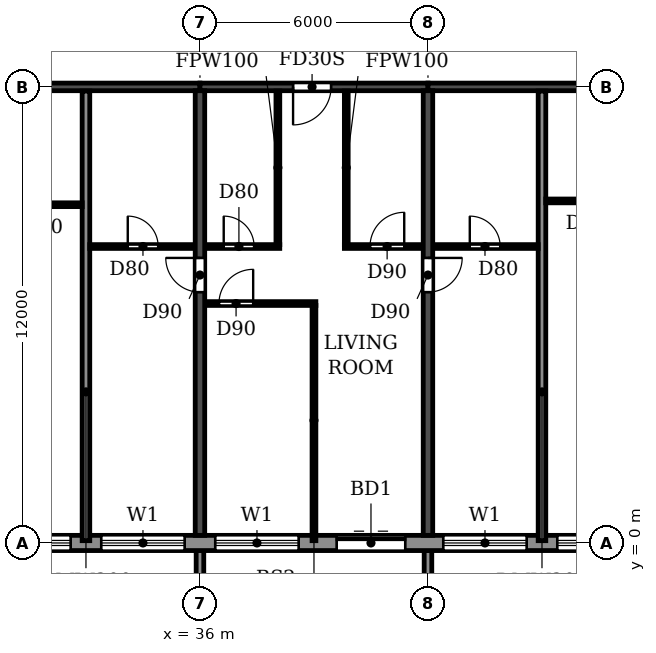
"""IFC4 building model, lengths in metres.
Left out: names, types, materials, properties, quantities, classifications, styles, units other than length and angle.
Written with IfcOpenShell. Run it as: python <this file> out.ifc"""

import sys

from ifc_helpers import new_model, si_unit, direction, frame, frame_2d, origin, place, context, subcontext, project, spatial, polyline, rectangle, outline, extrude, source, transform, mapped, element, fill, save


model = new_model("IFC4")
c1 = context("Model", 3, precision=1e-05, world=origin(), true_north=direction((0.0, 1.0)))
c2 = subcontext(c1, "Body", "Model", "MODEL_VIEW")
j1 = project(units=[si_unit("LENGTHUNIT", "METRE"), si_unit("PLANEANGLEUNIT", "RADIAN")], contexts=[c1])
p1 = place(None, origin())
s1 = spatial("IfcSite", under=j1, at=p1, CompositionType="ELEMENT")
p2 = place(p1, origin())
s2 = spatial("IfcBuilding", under=s1, at=p2, CompositionType="ELEMENT")
p3 = place(p2, frame((0.0, 0.0, 231.3)))
s3 = spatial("IfcBuildingStorey", under=s2, at=p3, CompositionType="ELEMENT", Elevation=231.3)
p4 = place(p3, frame((36.0, 0.2, 0.0), z_axis=(0.0, 0.0, 1.0), x_axis=(0.0, 1.0, 0.0)))
e1 = element("IfcWall", 1, at=p4, inside=s3, PredefinedType="SHEAR", context=c2, shape_type="SweptSolid", body=[
    extrude(rectangle(XDim=11.7, YDim=0.25, at=frame_2d((5.85, 0.0))), origin(), (0.0, 0.0, 1.0), 3.08),
])
p5 = place(p4, frame((6.4, 0.0, 0.0)))
e2 = element("IfcOpeningElement", 2, at=p5, cuts=e1, PredefinedType="OPENING", context=c2, shape_type="SweptSolid", body=[
    extrude(rectangle(XDim=0.9, YDim=2.1, at=frame_2d((0.45, 1.05))), frame((0.0, 0.135, 0.0), z_axis=(0.0, -1.0, 0.0), x_axis=(1.0, 0.0, 0.0)), (0.0, 0.0, 1.0), 0.27),
])
p6 = place(p3, frame((42.0, 0.2, 0.0), z_axis=(0.0, 0.0, 1.0), x_axis=(0.0, 1.0, 0.0)))
e3 = element("IfcWall", 3, at=p6, inside=s3, PredefinedType="SHEAR", context=c2, shape_type="SweptSolid", body=[
    extrude(rectangle(XDim=11.7, YDim=0.25, at=frame_2d((5.85, 0.0))), origin(), (0.0, 0.0, 1.0), 3.08),
])
p7 = place(p6, frame((6.4, 0.0, 0.0)))
e4 = element("IfcOpeningElement", 4, at=p7, cuts=e3, PredefinedType="OPENING", context=c2, shape_type="SweptSolid", body=[
    extrude(rectangle(XDim=0.9, YDim=2.1, at=frame_2d((0.45, 1.05))), frame((0.0, 0.135, 0.0), z_axis=(0.0, -1.0, 0.0), x_axis=(1.0, 0.0, 0.0)), (0.0, 0.0, 1.0), 0.27),
])
p8 = place(p3, frame((30.0, 12.0, 0.0), z_axis=(0.0, 0.0, 1.0), x_axis=(1.0, 0.0, 0.0)))
e5 = element("IfcWall", 5, at=p8, inside=s3, PredefinedType="SHEAR", context=c2, shape_type="SweptSolid", body=[
    extrude(rectangle(XDim=6.0, YDim=0.2, at=frame_2d((3.0, 0.0))), origin(), (0.0, 0.0, 1.0), 2.48),
])
p9 = place(p3, frame((36.0, 12.0, 0.0), z_axis=(0.0, 0.0, 1.0), x_axis=(1.0, 0.0, 0.0)))
e6 = element("IfcWall", 6, at=p9, inside=s3, PredefinedType="SHEAR", context=c2, shape_type="SweptSolid", body=[
    extrude(rectangle(XDim=6.0, YDim=0.2, at=frame_2d((3.0, 0.0))), origin(), (0.0, 0.0, 1.0), 2.48),
])
p10 = place(p9, frame((2.45, 0.0, 0.0)))
e7 = element("IfcOpeningElement", 7, at=p10, cuts=e6, PredefinedType="OPENING", context=c2, shape_type="SweptSolid", body=[
    extrude(rectangle(XDim=1.0, YDim=2.1, at=frame_2d((0.5, 1.05))), frame((0.0, 0.11, 0.0), z_axis=(0.0, -1.0, 0.0), x_axis=(1.0, 0.0, 0.0)), (0.0, 0.0, 1.0), 0.22),
])
p11 = place(p3, frame((42.0, 12.0, 0.0), z_axis=(0.0, 0.0, 1.0), x_axis=(1.0, 0.0, 0.0)))
e8 = element("IfcWall", 8, at=p11, inside=s3, PredefinedType="SHEAR", context=c2, shape_type="SweptSolid", body=[
    extrude(rectangle(XDim=6.0, YDim=0.2, at=frame_2d((3.0, 0.0))), origin(), (0.0, 0.0, 1.0), 2.48),
])
p12 = place(p3, frame((22.683, 0.0, 0.0), z_axis=(0.0, 0.0, 1.0), x_axis=(1.0, 0.0, 0.0)))
e9 = element("IfcWall", 9, at=p12, inside=s3, PredefinedType="STANDARD", context=c2, shape_type="SweptSolid", body=[
    extrude(rectangle(XDim=56.634, YDim=0.4, at=frame_2d((28.317, 0.0))), origin(), (0.0, 0.0, 1.0), 3.08),
])
p13 = place(p12, frame((1.917, 0.0, 0.0)))
e10 = element("IfcOpeningElement", 10, at=p13, cuts=e9, PredefinedType="OPENING", context=c2, shape_type="SweptSolid", body=[
    extrude(rectangle(XDim=1.8, YDim=2.4, at=frame_2d((0.9, 1.2))), frame((0.0, 0.21, 0.0), z_axis=(0.0, -1.0, 0.0), x_axis=(1.0, 0.0, 0.0)), (0.0, 0.0, 1.0), 0.42),
])
p14 = place(p12, frame((4.717, 0.0, 0.9)))
e11 = element("IfcOpeningElement", 11, at=p14, cuts=e9, PredefinedType="OPENING", context=c2, shape_type="SweptSolid", body=[
    extrude(rectangle(XDim=2.2, YDim=1.5, at=frame_2d((1.1, 0.75))), frame((0.0, 0.21, 0.0), z_axis=(0.0, -1.0, 0.0), x_axis=(1.0, 0.0, 0.0)), (0.0, 0.0, 1.0), 0.42),
])
p15 = place(p12, frame((7.717, 0.0, 0.9)))
e12 = element("IfcOpeningElement", 12, at=p15, cuts=e9, PredefinedType="OPENING", context=c2, shape_type="SweptSolid", body=[
    extrude(rectangle(XDim=2.2, YDim=1.5, at=frame_2d((1.1, 0.75))), frame((0.0, 0.21, 0.0), z_axis=(0.0, -1.0, 0.0), x_axis=(1.0, 0.0, 0.0)), (0.0, 0.0, 1.0), 0.42),
])
p16 = place(p12, frame((10.717, 0.0, 0.9)))
e13 = element("IfcOpeningElement", 13, at=p16, cuts=e9, PredefinedType="OPENING", context=c2, shape_type="SweptSolid", body=[
    extrude(rectangle(XDim=2.2, YDim=1.5, at=frame_2d((1.1, 0.75))), frame((0.0, 0.21, 0.0), z_axis=(0.0, -1.0, 0.0), x_axis=(1.0, 0.0, 0.0)), (0.0, 0.0, 1.0), 0.42),
])
p17 = place(p12, frame((13.717, 0.0, 0.9)))
e14 = element("IfcOpeningElement", 14, at=p17, cuts=e9, PredefinedType="OPENING", context=c2, shape_type="SweptSolid", body=[
    extrude(rectangle(XDim=2.2, YDim=1.5, at=frame_2d((1.1, 0.75))), frame((0.0, 0.21, 0.0), z_axis=(0.0, -1.0, 0.0), x_axis=(1.0, 0.0, 0.0)), (0.0, 0.0, 1.0), 0.42),
])
p18 = place(p12, frame((16.917, 0.0, 0.0)))
e15 = element("IfcOpeningElement", 15, at=p18, cuts=e9, PredefinedType="OPENING", context=c2, shape_type="SweptSolid", body=[
    extrude(rectangle(XDim=1.8, YDim=2.4, at=frame_2d((0.9, 1.2))), frame((0.0, 0.21, 0.0), z_axis=(0.0, -1.0, 0.0), x_axis=(1.0, 0.0, 0.0)), (0.0, 0.0, 1.0), 0.42),
])
p19 = place(p12, frame((19.717, 0.0, 0.9)))
e16 = element("IfcOpeningElement", 16, at=p19, cuts=e9, PredefinedType="OPENING", context=c2, shape_type="SweptSolid", body=[
    extrude(rectangle(XDim=2.2, YDim=1.5, at=frame_2d((1.1, 0.75))), frame((0.0, 0.21, 0.0), z_axis=(0.0, -1.0, 0.0), x_axis=(1.0, 0.0, 0.0)), (0.0, 0.0, 1.0), 0.42),
])
p20 = place(p12, frame((22.717, 0.0, 0.9)))
e17 = element("IfcOpeningElement", 17, at=p20, cuts=e9, PredefinedType="OPENING", context=c2, shape_type="SweptSolid", body=[
    extrude(rectangle(XDim=2.2, YDim=1.5, at=frame_2d((1.1, 0.75))), frame((0.0, 0.21, 0.0), z_axis=(0.0, -1.0, 0.0), x_axis=(1.0, 0.0, 0.0)), (0.0, 0.0, 1.0), 0.42),
])
p21 = place(p12, frame((25.917, 0.0, 0.0)))
e18 = element("IfcOpeningElement", 18, at=p21, cuts=e9, PredefinedType="OPENING", context=c2, shape_type="SweptSolid", body=[
    extrude(rectangle(XDim=1.8, YDim=2.4, at=frame_2d((0.9, 1.2))), frame((0.0, 0.21, 0.0), z_axis=(0.0, -1.0, 0.0), x_axis=(1.0, 0.0, 0.0)), (0.0, 0.0, 1.0), 0.42),
])
p22 = place(p12, frame((28.717, 0.0, 0.9)))
e19 = element("IfcOpeningElement", 19, at=p22, cuts=e9, PredefinedType="OPENING", context=c2, shape_type="SweptSolid", body=[
    extrude(rectangle(XDim=2.2, YDim=1.5, at=frame_2d((1.1, 0.75))), frame((0.0, 0.21, 0.0), z_axis=(0.0, -1.0, 0.0), x_axis=(1.0, 0.0, 0.0)), (0.0, 0.0, 1.0), 0.42),
])
p23 = place(p12, frame((31.717, 0.0, 0.9)))
e20 = element("IfcOpeningElement", 20, at=p23, cuts=e9, PredefinedType="OPENING", context=c2, shape_type="SweptSolid", body=[
    extrude(rectangle(XDim=2.2, YDim=1.5, at=frame_2d((1.1, 0.75))), frame((0.0, 0.21, 0.0), z_axis=(0.0, -1.0, 0.0), x_axis=(1.0, 0.0, 0.0)), (0.0, 0.0, 1.0), 0.42),
])
p24 = place(p12, frame((34.717, 0.0, 0.9)))
e21 = element("IfcOpeningElement", 21, at=p24, cuts=e9, PredefinedType="OPENING", context=c2, shape_type="SweptSolid", body=[
    extrude(rectangle(XDim=2.2, YDim=1.5, at=frame_2d((1.1, 0.75))), frame((0.0, 0.21, 0.0), z_axis=(0.0, -1.0, 0.0), x_axis=(1.0, 0.0, 0.0)), (0.0, 0.0, 1.0), 0.42),
])
p25 = place(p12, frame((37.717, 0.0, 0.9)))
e22 = element("IfcOpeningElement", 22, at=p25, cuts=e9, PredefinedType="OPENING", context=c2, shape_type="SweptSolid", body=[
    extrude(rectangle(XDim=2.2, YDim=1.5, at=frame_2d((1.1, 0.75))), frame((0.0, 0.21, 0.0), z_axis=(0.0, -1.0, 0.0), x_axis=(1.0, 0.0, 0.0)), (0.0, 0.0, 1.0), 0.42),
])
p26 = place(p12, frame((40.917, 0.0, 0.0)))
e23 = element("IfcOpeningElement", 23, at=p26, cuts=e9, PredefinedType="OPENING", context=c2, shape_type="SweptSolid", body=[
    extrude(rectangle(XDim=1.8, YDim=2.4, at=frame_2d((0.9, 1.2))), frame((0.0, 0.21, 0.0), z_axis=(0.0, -1.0, 0.0), x_axis=(1.0, 0.0, 0.0)), (0.0, 0.0, 1.0), 0.42),
])
p27 = place(p12, frame((43.717, 0.0, 0.9)))
e24 = element("IfcOpeningElement", 24, at=p27, cuts=e9, PredefinedType="OPENING", context=c2, shape_type="SweptSolid", body=[
    extrude(rectangle(XDim=2.2, YDim=1.5, at=frame_2d((1.1, 0.75))), frame((0.0, 0.21, 0.0), z_axis=(0.0, -1.0, 0.0), x_axis=(1.0, 0.0, 0.0)), (0.0, 0.0, 1.0), 0.42),
])
p28 = place(p12, frame((46.717, 0.0, 0.9)))
e25 = element("IfcOpeningElement", 25, at=p28, cuts=e9, PredefinedType="OPENING", context=c2, shape_type="SweptSolid", body=[
    extrude(rectangle(XDim=2.2, YDim=1.5, at=frame_2d((1.1, 0.75))), frame((0.0, 0.21, 0.0), z_axis=(0.0, -1.0, 0.0), x_axis=(1.0, 0.0, 0.0)), (0.0, 0.0, 1.0), 0.42),
])
p29 = place(p12, frame((49.717, 0.0, 0.9)))
e26 = element("IfcOpeningElement", 26, at=p29, cuts=e9, PredefinedType="OPENING", context=c2, shape_type="SweptSolid", body=[
    extrude(rectangle(XDim=2.2, YDim=1.5, at=frame_2d((1.1, 0.75))), frame((0.0, 0.21, 0.0), z_axis=(0.0, -1.0, 0.0), x_axis=(1.0, 0.0, 0.0)), (0.0, 0.0, 1.0), 0.42),
])
p30 = place(p12, frame((52.717, 0.0, 0.9)))
e27 = element("IfcOpeningElement", 27, at=p30, cuts=e9, PredefinedType="OPENING", context=c2, shape_type="SweptSolid", body=[
    extrude(rectangle(XDim=2.2, YDim=1.5, at=frame_2d((1.1, 0.75))), frame((0.0, 0.21, 0.0), z_axis=(0.0, -1.0, 0.0), x_axis=(1.0, 0.0, 0.0)), (0.0, 0.0, 1.0), 0.42),
])
m1 = source(origin(), c2, "Body", "SweptSolid", [
    extrude(outline(polyline([(0.0, 0.0), (0.2, 0.0), (0.2, 1.65), (0.0, 1.65), (0.0, 0.0)])), origin(), (0.0, 0.0, 1.0), 3.1),
])
for number, where in (
    (28, (35.9, -1.85, 0.0)),
    (29, (41.9, -1.85, 0.0)),
):
    element("IfcWall", number, at=place(p3, frame(where)), inside=s3, PredefinedType="STANDARD", context=c2, shape_type="MappedRepresentation", body=[
        mapped(m1, transform((0.0, 0.0, 0.0))),
    ])
for number, where, z_axis, x_axis in (
    (30, (33.0, 0.06, 0.0), (0.0, 0.0, 1.0), (0.0, 1.0, 0.0)),
    (31, (45.0, 0.06, 0.0), (0.0, 0.0, 1.0), (0.0, 1.0, 0.0)),
):
    element("IfcWall", number, at=place(p3, frame(where, z_axis=z_axis, x_axis=x_axis)), inside=s3, PredefinedType="PARTITIONING", context=c2, shape_type="SweptSolid", body=[
        extrude(rectangle(XDim=11.83, YDim=0.2, at=frame_2d((5.915, 0.0))), origin(), (0.0, 0.0, 1.0), 3.08),
    ])
p31 = place(p3, frame((36.135, 6.3, 0.0), z_axis=(0.0, 0.0, 1.0), x_axis=(1.0, 0.0, 0.0)))
e32 = element("IfcWall", 32, at=p31, inside=s3, PredefinedType="PARTITIONING", context=c2, shape_type="SweptSolid", body=[
    extrude(rectangle(XDim=2.915, YDim=0.1, at=frame_2d((1.458, 0.0))), origin(), (0.0, 0.0, 1.0), 3.08),
])
p32 = place(p31, frame((0.365, 0.0, 0.0)))
e33 = element("IfcOpeningElement", 33, at=p32, cuts=e32, PredefinedType="OPENING", context=c2, shape_type="SweptSolid", body=[
    extrude(rectangle(XDim=0.9, YDim=2.1, at=frame_2d((0.45, 1.05))), frame((0.0, 0.06, 0.0), z_axis=(0.0, -1.0, 0.0), x_axis=(1.0, 0.0, 0.0)), (0.0, 0.0, 1.0), 0.12),
])
p33 = place(p3, frame((33.1, 7.8, 0.0), z_axis=(0.0, 0.0, 1.0), x_axis=(1.0, 0.0, 0.0)))
e34 = element("IfcWall", 34, at=p33, inside=s3, PredefinedType="PARTITIONING", context=c2, shape_type="SweptSolid", body=[
    extrude(rectangle(XDim=2.765, YDim=0.1, at=frame_2d((1.382, 0.0))), origin(), (0.0, 0.0, 1.0), 3.08),
])
p34 = place(p33, frame((1.0, 0.0, 0.0)))
e35 = element("IfcOpeningElement", 35, at=p34, cuts=e34, PredefinedType="OPENING", context=c2, shape_type="SweptSolid", body=[
    extrude(rectangle(XDim=0.8, YDim=2.1, at=frame_2d((0.4, 1.05))), frame((0.0, 0.06, 0.0), z_axis=(0.0, -1.0, 0.0), x_axis=(1.0, 0.0, 0.0)), (0.0, 0.0, 1.0), 0.12),
])
p35 = place(p3, frame((36.135, 7.8, 0.0), z_axis=(0.0, 0.0, 1.0), x_axis=(1.0, 0.0, 0.0)))
e36 = element("IfcWall", 36, at=p35, inside=s3, PredefinedType="PARTITIONING", context=c2, shape_type="SweptSolid", body=[
    extrude(rectangle(XDim=1.965, YDim=0.1, at=frame_2d((0.982, 0.0))), origin(), (0.0, 0.0, 1.0), 3.08),
])
p36 = place(p35, frame((0.49, 0.0, 0.0)))
e37 = element("IfcOpeningElement", 37, at=p36, cuts=e36, PredefinedType="OPENING", context=c2, shape_type="SweptSolid", body=[
    extrude(rectangle(XDim=0.8, YDim=2.1, at=frame_2d((0.4, 1.05))), frame((0.0, 0.06, 0.0), z_axis=(0.0, -1.0, 0.0), x_axis=(1.0, 0.0, 0.0)), (0.0, 0.0, 1.0), 0.12),
])
p37 = place(p3, frame((39.8, 7.8, 0.0), z_axis=(0.0, 0.0, 1.0), x_axis=(1.0, 0.0, 0.0)))
e38 = element("IfcWall", 38, at=p37, inside=s3, PredefinedType="PARTITIONING", context=c2, shape_type="SweptSolid", body=[
    extrude(rectangle(XDim=2.065, YDim=0.1, at=frame_2d((1.032, 0.0))), origin(), (0.0, 0.0, 1.0), 3.08),
])
p38 = place(p37, frame((0.675, 0.0, 0.0)))
e39 = element("IfcOpeningElement", 39, at=p38, cuts=e38, PredefinedType="OPENING", context=c2, shape_type="SweptSolid", body=[
    extrude(rectangle(XDim=0.9, YDim=2.1, at=frame_2d((0.45, 1.05))), frame((0.0, 0.06, 0.0), z_axis=(0.0, -1.0, 0.0), x_axis=(1.0, 0.0, 0.0)), (0.0, 0.0, 1.0), 0.12),
])
p39 = place(p3, frame((42.135, 7.8, 0.0), z_axis=(0.0, 0.0, 1.0), x_axis=(1.0, 0.0, 0.0)))
e40 = element("IfcWall", 40, at=p39, inside=s3, PredefinedType="PARTITIONING", context=c2, shape_type="SweptSolid", body=[
    extrude(rectangle(XDim=2.765, YDim=0.1, at=frame_2d((1.382, 0.0))), origin(), (0.0, 0.0, 1.0), 3.08),
])
p40 = place(p39, frame((0.965, 0.0, 0.0)))
e41 = element("IfcOpeningElement", 41, at=p40, cuts=e40, PredefinedType="OPENING", context=c2, shape_type="SweptSolid", body=[
    extrude(rectangle(XDim=0.8, YDim=2.1, at=frame_2d((0.4, 1.05))), frame((0.0, 0.06, 0.0), z_axis=(0.0, -1.0, 0.0), x_axis=(1.0, 0.0, 0.0)), (0.0, 0.0, 1.0), 0.12),
])
p41 = place(p3, frame((30.135, 8.9, 0.0), z_axis=(0.0, 0.0, 1.0), x_axis=(1.0, 0.0, 0.0)))
e42 = element("IfcWall", 42, at=p41, inside=s3, PredefinedType="PARTITIONING", context=c2, shape_type="SweptSolid", body=[
    extrude(rectangle(XDim=2.765, YDim=0.1, at=frame_2d((1.382, 0.0))), origin(), (0.0, 0.0, 1.0), 3.08),
])
p42 = place(p41, frame((0.965, 0.0, 0.0)))
e43 = element("IfcOpeningElement", 43, at=p42, cuts=e42, PredefinedType="OPENING", context=c2, shape_type="SweptSolid", body=[
    extrude(rectangle(XDim=0.8, YDim=2.1, at=frame_2d((0.4, 1.05))), frame((0.0, 0.06, 0.0), z_axis=(0.0, -1.0, 0.0), x_axis=(1.0, 0.0, 0.0)), (0.0, 0.0, 1.0), 0.12),
])
p43 = place(p3, frame((45.1, 9.0, 0.0), z_axis=(0.0, 0.0, 1.0), x_axis=(1.0, 0.0, 0.0)))
e44 = element("IfcWall", 44, at=p43, inside=s3, PredefinedType="PARTITIONING", context=c2, shape_type="SweptSolid", body=[
    extrude(rectangle(XDim=2.765, YDim=0.1, at=frame_2d((1.382, 0.0))), origin(), (0.0, 0.0, 1.0), 3.08),
])
p44 = place(p43, frame((1.0, 0.0, 0.0)))
e45 = element("IfcOpeningElement", 45, at=p44, cuts=e44, PredefinedType="OPENING", context=c2, shape_type="SweptSolid", body=[
    extrude(rectangle(XDim=0.8, YDim=2.1, at=frame_2d((0.4, 1.05))), frame((0.0, 0.06, 0.0), z_axis=(0.0, -1.0, 0.0), x_axis=(1.0, 0.0, 0.0)), (0.0, 0.0, 1.0), 0.12),
])
p45 = place(p3, frame((38.05, 7.85, 0.0), z_axis=(0.0, 0.0, 1.0), x_axis=(0.0, 1.0, 0.0)))
e46 = element("IfcWall", 46, at=p45, inside=s3, PredefinedType="PARTITIONING", context=c2, shape_type="SweptSolid", body=[
    extrude(rectangle(XDim=4.04, YDim=0.1, at=frame_2d((2.02, 0.0))), origin(), (0.0, 0.0, 1.0), 3.08),
])
p46 = place(p3, frame((39.0, 0.06, 0.0), z_axis=(0.0, 0.0, 1.0), x_axis=(0.0, 1.0, 0.0)))
e47 = element("IfcWall", 47, at=p46, inside=s3, PredefinedType="PARTITIONING", context=c2, shape_type="SweptSolid", body=[
    extrude(rectangle(XDim=6.19, YDim=0.1, at=frame_2d((3.095, 0.0))), origin(), (0.0, 0.0, 1.0), 3.08),
])
p47 = place(p3, frame((39.85, 7.85, 0.0), z_axis=(0.0, 0.0, 1.0), x_axis=(0.0, 1.0, 0.0)))
e48 = element("IfcWall", 48, at=p47, inside=s3, PredefinedType="PARTITIONING", context=c2, shape_type="SweptSolid", body=[
    extrude(rectangle(XDim=4.04, YDim=0.1, at=frame_2d((2.02, 0.0))), origin(), (0.0, 0.0, 1.0), 3.08),
])
p48 = place(p15, origin())
e49 = element("IfcWindow", 49, at=p48, inside=s3, PartitioningType="DOUBLE_PANEL_HORIZONTAL", PredefinedType="WINDOW", context=c2, shape_type="SweptSolid", body=[
    extrude(rectangle(XDim=2.2, YDim=1.5, at=frame_2d((1.1, 0.75))), frame((0.0, 0.03, 0.0), z_axis=(0.0, -1.0, 0.0), x_axis=(1.0, 0.0, 0.0)), (0.0, 0.0, 1.0), 0.06),
])
fill(e12, e49)
p49 = place(p16, origin())
e50 = element("IfcWindow", 50, at=p49, inside=s3, PartitioningType="DOUBLE_PANEL_HORIZONTAL", PredefinedType="WINDOW", context=c2, shape_type="SweptSolid", body=[
    extrude(rectangle(XDim=2.2, YDim=1.5, at=frame_2d((1.1, 0.75))), frame((0.0, 0.03, 0.0), z_axis=(0.0, -1.0, 0.0), x_axis=(1.0, 0.0, 0.0)), (0.0, 0.0, 1.0), 0.06),
])
fill(e13, e50)
p50 = place(p17, origin())
e51 = element("IfcWindow", 51, at=p50, inside=s3, PartitioningType="DOUBLE_PANEL_HORIZONTAL", PredefinedType="WINDOW", context=c2, shape_type="SweptSolid", body=[
    extrude(rectangle(XDim=2.2, YDim=1.5, at=frame_2d((1.1, 0.75))), frame((0.0, 0.03, 0.0), z_axis=(0.0, -1.0, 0.0), x_axis=(1.0, 0.0, 0.0)), (0.0, 0.0, 1.0), 0.06),
])
fill(e14, e51)
p51 = place(p18, origin())
e52 = element("IfcDoor", 52, at=p51, inside=s3, OperationType="DOUBLE_DOOR_SLIDING", PredefinedType="DOOR", context=c2, shape_type="SweptSolid", body=[
    extrude(rectangle(XDim=1.8, YDim=2.4, at=frame_2d((0.9, 1.2))), frame((0.0, 0.025, 0.0), z_axis=(0.0, -1.0, 0.0), x_axis=(1.0, 0.0, 0.0)), (0.0, 0.0, 1.0), 0.05),
])
fill(e15, e52)
p52 = place(p19, origin())
e53 = element("IfcWindow", 53, at=p52, inside=s3, PartitioningType="DOUBLE_PANEL_HORIZONTAL", PredefinedType="WINDOW", context=c2, shape_type="SweptSolid", body=[
    extrude(rectangle(XDim=2.2, YDim=1.5, at=frame_2d((1.1, 0.75))), frame((0.0, 0.03, 0.0), z_axis=(0.0, -1.0, 0.0), x_axis=(1.0, 0.0, 0.0)), (0.0, 0.0, 1.0), 0.06),
])
fill(e16, e53)
p53 = place(p20, origin())
e54 = element("IfcWindow", 54, at=p53, inside=s3, PartitioningType="DOUBLE_PANEL_HORIZONTAL", PredefinedType="WINDOW", context=c2, shape_type="SweptSolid", body=[
    extrude(rectangle(XDim=2.2, YDim=1.5, at=frame_2d((1.1, 0.75))), frame((0.0, 0.03, 0.0), z_axis=(0.0, -1.0, 0.0), x_axis=(1.0, 0.0, 0.0)), (0.0, 0.0, 1.0), 0.06),
])
fill(e17, e54)
p54 = place(p34, origin())
e55 = element("IfcDoor", 55, at=p54, inside=s3, OperationType="SINGLE_SWING_LEFT", PredefinedType="DOOR", context=c2, shape_type="SweptSolid", body=[
    extrude(rectangle(XDim=0.8, YDim=2.1, at=frame_2d((0.4, 1.05))), frame((0.0, 0.025, 0.0), z_axis=(0.0, -1.0, 0.0), x_axis=(1.0, 0.0, 0.0)), (0.0, 0.0, 1.0), 0.05),
])
fill(e35, e55)
p55 = place(p40, origin())
e56 = element("IfcDoor", 56, at=p55, inside=s3, OperationType="SINGLE_SWING_LEFT", PredefinedType="DOOR", context=c2, shape_type="SweptSolid", body=[
    extrude(rectangle(XDim=0.8, YDim=2.1, at=frame_2d((0.4, 1.05))), frame((0.0, 0.025, 0.0), z_axis=(0.0, -1.0, 0.0), x_axis=(1.0, 0.0, 0.0)), (0.0, 0.0, 1.0), 0.05),
])
fill(e41, e56)
p56 = place(p5, origin())
e57 = element("IfcDoor", 57, at=p56, inside=s3, OperationType="SINGLE_SWING_RIGHT", PredefinedType="DOOR", context=c2, shape_type="SweptSolid", body=[
    extrude(rectangle(XDim=0.9, YDim=2.1, at=frame_2d((0.45, 1.05))), frame((0.0, 0.025, 0.0), z_axis=(0.0, -1.0, 0.0), x_axis=(1.0, 0.0, 0.0)), (0.0, 0.0, 1.0), 0.05),
])
fill(e2, e57)
p57 = place(p32, origin())
e58 = element("IfcDoor", 58, at=p57, inside=s3, OperationType="SINGLE_SWING_RIGHT", PredefinedType="DOOR", context=c2, shape_type="SweptSolid", body=[
    extrude(rectangle(XDim=0.9, YDim=2.1, at=frame_2d((0.45, 1.05))), frame((0.0, 0.025, 0.0), z_axis=(0.0, -1.0, 0.0), x_axis=(1.0, 0.0, 0.0)), (0.0, 0.0, 1.0), 0.05),
])
fill(e33, e58)
p58 = place(p36, origin())
e59 = element("IfcDoor", 59, at=p58, inside=s3, OperationType="SINGLE_SWING_LEFT", PredefinedType="DOOR", context=c2, shape_type="SweptSolid", body=[
    extrude(rectangle(XDim=0.8, YDim=2.1, at=frame_2d((0.4, 1.05))), frame((0.0, 0.025, 0.0), z_axis=(0.0, -1.0, 0.0), x_axis=(1.0, 0.0, 0.0)), (0.0, 0.0, 1.0), 0.05),
])
fill(e37, e59)
p59 = place(p10, frame((1.0, 0.0, 0.0), z_axis=(0.0, 0.0, 1.0), x_axis=(-1.0, 0.0, 0.0)))
e60 = element("IfcDoor", 60, at=p59, inside=s3, OperationType="SINGLE_SWING_RIGHT", PredefinedType="DOOR", context=c2, shape_type="SweptSolid", body=[
    extrude(rectangle(XDim=1.0, YDim=2.1, at=frame_2d((0.5, 1.05))), frame((0.0, 0.025, 0.0), z_axis=(0.0, -1.0, 0.0), x_axis=(1.0, 0.0, 0.0)), (0.0, 0.0, 1.0), 0.05),
])
fill(e7, e60)
p60 = place(p38, origin())
e61 = element("IfcDoor", 61, at=p60, inside=s3, OperationType="SINGLE_SWING_RIGHT", PredefinedType="DOOR", context=c2, shape_type="SweptSolid", body=[
    extrude(rectangle(XDim=0.9, YDim=2.1, at=frame_2d((0.45, 1.05))), frame((0.0, 0.025, 0.0), z_axis=(0.0, -1.0, 0.0), x_axis=(1.0, 0.0, 0.0)), (0.0, 0.0, 1.0), 0.05),
])
fill(e39, e61)
p61 = place(p7, frame((0.9, 0.0, 0.0), z_axis=(0.0, 0.0, 1.0), x_axis=(-1.0, 0.0, 0.0)))
e62 = element("IfcDoor", 62, at=p61, inside=s3, OperationType="SINGLE_SWING_LEFT", PredefinedType="DOOR", context=c2, shape_type="SweptSolid", body=[
    extrude(rectangle(XDim=0.9, YDim=2.1, at=frame_2d((0.45, 1.05))), frame((0.0, 0.025, 0.0), z_axis=(0.0, -1.0, 0.0), x_axis=(1.0, 0.0, 0.0)), (0.0, 0.0, 1.0), 0.05),
])
fill(e4, e62)
save(model, sys.argv[1])
